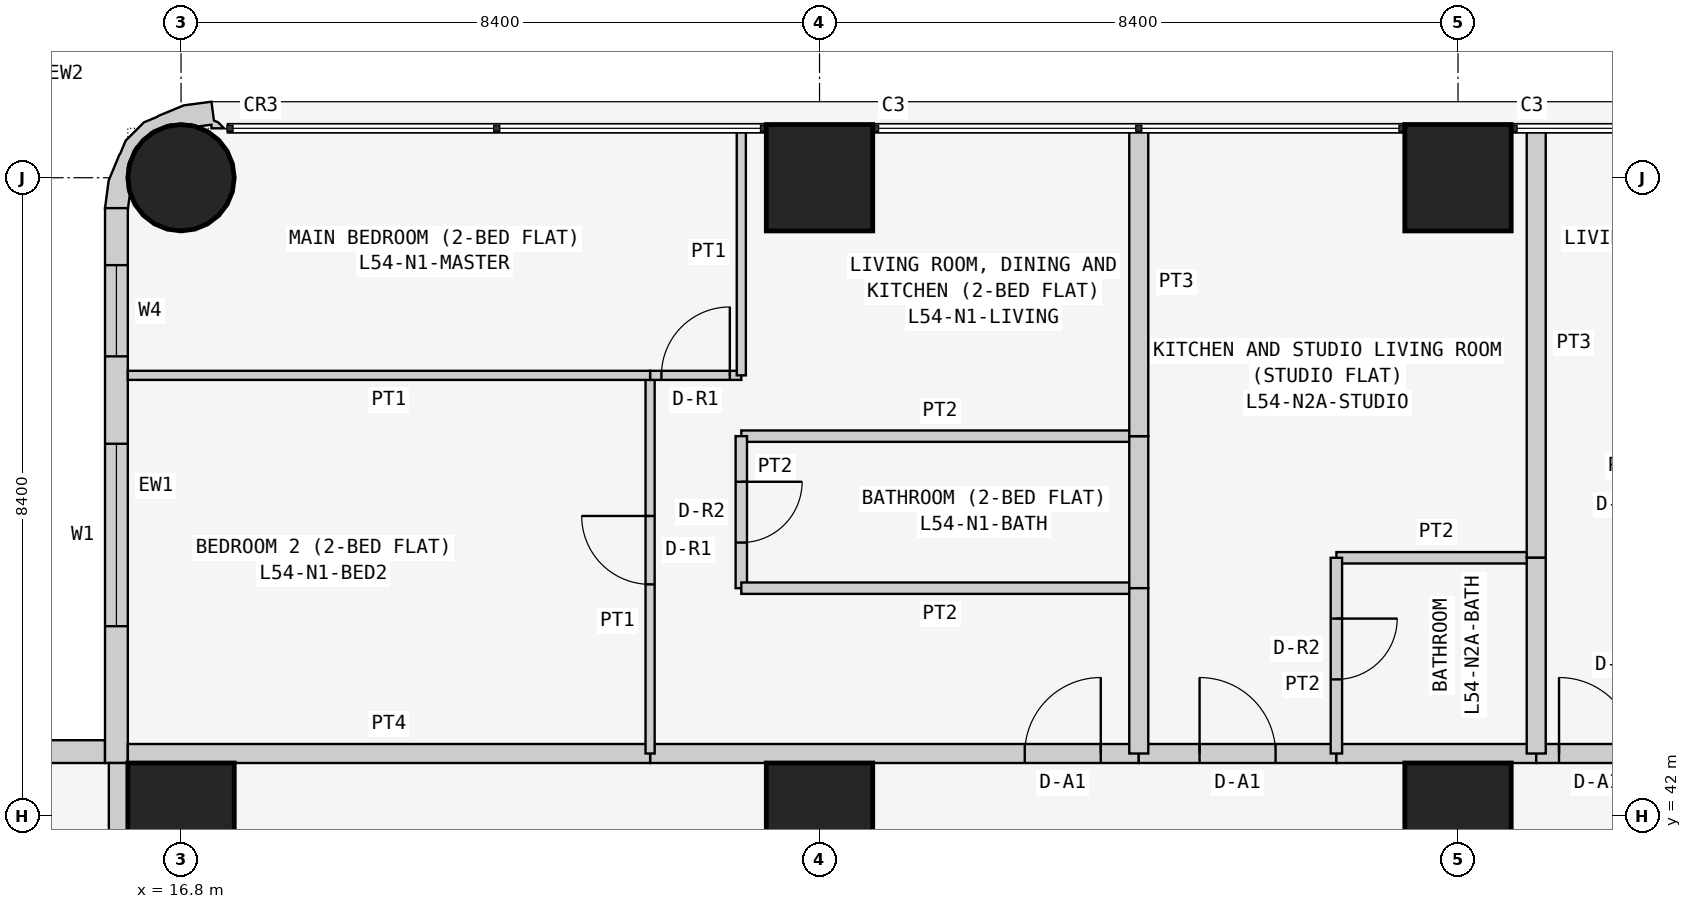
"""IFC4 building model, lengths in metres.
Left out: names, types, materials, properties, quantities, classifications, styles, units other than length and angle.
Written with IfcOpenShell. Run it as: python <this file> out.ifc"""

import sys

from ifc_helpers import new_model, si_unit, direction, frame, frame_2d, origin, origin_2d, place, context, subcontext, project, spatial, polyline, rectangle, circle, outline, extrude, element, fill, save


model = new_model("IFC4")
c1 = context("Model", 3, precision=1e-05, world=origin(), true_north=direction((0.0, 1.0)))
c2 = subcontext(c1, "Body", "Model", "MODEL_VIEW")
j1 = project(units=[si_unit("LENGTHUNIT", "METRE"), si_unit("PLANEANGLEUNIT", "RADIAN")], contexts=[c1])
p1 = place(None, origin())
s1 = spatial("IfcSite", under=j1, at=p1, CompositionType="ELEMENT")
p2 = place(p1, origin())
s2 = spatial("IfcBuilding", under=s1, at=p2, CompositionType="ELEMENT")
p3 = place(p2, frame((0.0, 0.0, 208.5)))
s3 = spatial("IfcBuildingStorey", under=s2, at=p3, CompositionType="ELEMENT", Elevation=208.5)
p4 = place(p3, frame((16.8, 42.0, 0.0), z_axis=(0.0, 0.0, 1.0), x_axis=(1.0, 0.0, 0.0)))
e1 = element("IfcColumn", 1, at=p4, inside=s3, PredefinedType="COLUMN", context=c2, shape_type="SweptSolid", body=[
    extrude(rectangle(XDim=1.4, YDim=1.4, at=origin_2d()), origin(), (0.0, 0.0, 1.0), 3.6),
])
p5 = place(p3, frame((16.8, 50.4, 0.0), z_axis=(0.0, 0.0, 1.0), x_axis=(1.0, 0.0, 0.0)))
e2 = element("IfcColumn", 2, at=p5, inside=s3, PredefinedType="COLUMN", context=c2, shape_type="SweptSolid", body=[
    extrude(circle(Radius=0.7, at=origin_2d()), origin(), (0.0, 0.0, 1.0), 3.6),
])
for number, where, z_axis, x_axis in (
    (3, (25.2, 42.0, 0.0), (0.0, 0.0, 1.0), (1.0, 0.0, 0.0)),
    (4, (25.2, 50.4, 0.0), (0.0, 0.0, 1.0), (1.0, 0.0, 0.0)),
    (5, (33.6, 42.0, 0.0), (0.0, 0.0, 1.0), (1.0, 0.0, 0.0)),
    (6, (33.6, 50.4, 0.0), (0.0, 0.0, 1.0), (1.0, 0.0, 0.0)),
):
    element("IfcColumn", number, at=place(p3, frame(where, z_axis=z_axis, x_axis=x_axis)), inside=s3, PredefinedType="COLUMN", context=c2, shape_type="SweptSolid", body=[
        extrude(rectangle(XDim=1.4, YDim=1.4, at=origin_2d()), origin(), (0.0, 0.0, 1.0), 3.6),
    ])
p6 = place(p3, frame((15.8, 42.85, 0.0), z_axis=(0.0, 0.0, 1.0), x_axis=(-1.0, 0.0, 0.0)))
e7 = element("IfcWall", 7, at=p6, inside=s3, PredefinedType="SOLIDWALL", context=c2, shape_type="SweptSolid", body=[
    extrude(rectangle(XDim=15.4, YDim=0.3, at=frame_2d((7.7, 0.0))), origin(), (0.0, 0.0, 1.0), 3.45),
])
p7 = place(p6, frame((1.2, 0.0, 0.9)))
e8 = element("IfcOpeningElement", 8, at=p7, cuts=e7, PredefinedType="OPENING", context=c2, shape_type="SweptSolid", body=[
    extrude(rectangle(XDim=1.8, YDim=1.5, at=frame_2d((0.9, 0.75))), frame((0.0, 0.16, 0.0), z_axis=(0.0, -1.0, 0.0), x_axis=(1.0, 0.0, 0.0)), (0.0, 0.0, 1.0), 0.32),
])
p8 = place(p6, frame((4.95, 0.0, 1.5)))
e9 = element("IfcOpeningElement", 9, at=p8, cuts=e7, PredefinedType="OPENING", context=c2, shape_type="SweptSolid", body=[
    extrude(rectangle(XDim=0.9, YDim=0.7, at=frame_2d((0.45, 0.35))), frame((0.0, 0.16, 0.0), z_axis=(0.0, -1.0, 0.0), x_axis=(1.0, 0.0, 0.0)), (0.0, 0.0, 1.0), 0.32),
])
p9 = place(p6, frame((8.5, 0.0, 0.9)))
e10 = element("IfcOpeningElement", 10, at=p9, cuts=e7, PredefinedType="OPENING", context=c2, shape_type="SweptSolid", body=[
    extrude(rectangle(XDim=1.8, YDim=1.5, at=frame_2d((0.9, 0.75))), frame((0.0, 0.16, 0.0), z_axis=(0.0, -1.0, 0.0), x_axis=(1.0, 0.0, 0.0)), (0.0, 0.0, 1.0), 0.32),
])
p10 = place(p6, frame((12.5, 0.0, 0.0)))
e11 = element("IfcOpeningElement", 11, at=p10, cuts=e7, PredefinedType="OPENING", context=c2, shape_type="SweptSolid", body=[
    extrude(rectangle(XDim=0.9, YDim=2.4, at=frame_2d((0.45, 1.2))), frame((0.0, 0.16, 0.0), z_axis=(0.0, -1.0, 0.0), x_axis=(1.0, 0.0, 0.0)), (0.0, 0.0, 1.0), 0.32),
])
p11 = place(p6, frame((13.5, 0.0, 0.9)))
e12 = element("IfcOpeningElement", 12, at=p11, cuts=e7, PredefinedType="OPENING", context=c2, shape_type="SweptSolid", body=[
    extrude(rectangle(XDim=1.2, YDim=1.5, at=frame_2d((0.6, 0.75))), frame((0.0, 0.16, 0.0), z_axis=(0.0, -1.0, 0.0), x_axis=(1.0, 0.0, 0.0)), (0.0, 0.0, 1.0), 0.32),
])
p12 = place(p3, frame((15.95, 50.0, 0.0), z_axis=(0.0, 0.0, 1.0), x_axis=(0.0, -1.0, 0.0)))
e13 = element("IfcWall", 13, at=p12, inside=s3, PredefinedType="SOLIDWALL", context=c2, shape_type="SweptSolid", body=[
    extrude(rectangle(XDim=7.3, YDim=0.3, at=frame_2d((3.65, 0.0))), origin(), (0.0, 0.0, 1.0), 3.45),
])
p13 = place(p12, frame((3.1, 0.0, 0.9)))
e14 = element("IfcOpeningElement", 14, at=p13, cuts=e13, PredefinedType="OPENING", context=c2, shape_type="SweptSolid", body=[
    extrude(rectangle(XDim=2.4, YDim=1.5, at=frame_2d((1.2, 0.75))), frame((0.0, 0.16, 0.0), z_axis=(0.0, -1.0, 0.0), x_axis=(1.0, 0.0, 0.0)), (0.0, 0.0, 1.0), 0.32),
])
p14 = place(p12, frame((0.75, 0.0, 0.9)))
e15 = element("IfcOpeningElement", 15, at=p14, cuts=e13, PredefinedType="OPENING", context=c2, shape_type="SweptSolid", body=[
    extrude(rectangle(XDim=1.2, YDim=1.5, at=frame_2d((0.6, 0.75))), frame((0.0, 0.16, 0.0), z_axis=(0.0, -1.0, 0.0), x_axis=(1.0, 0.0, 0.0)), (0.0, 0.0, 1.0), 0.32),
])
p15 = place(p3, frame((17.312, 50.988, 0.0), z_axis=(0.0, 0.0, 1.0), x_axis=(-0.439933741929, 0.898030234854, 0.0)))
e16 = element("IfcWall", 16, at=p15, inside=s3, PredefinedType="SOLIDWALL", context=c2, shape_type="SweptSolid", body=[
    extrude(outline(polyline([(0.138, -0.039), (0.182, -0.0), (0.419, -0.08), (0.536, 0.266), (0.559, 0.631), (0.555, 0.651), (0.566, 0.836), (0.456, 1.159), (0.333, 1.298), (0.324, 1.316), (0.082, 1.591), (-0.222, 1.793), (-0.39, 1.541), (-0.372, 1.532), (-0.195, 1.414), (-0.12, 1.41), (0.131, 1.287), (0.315, 1.078), (0.406, 0.814), (0.388, 0.536), (0.265, 0.285), (0.209, 0.236), (0.148, 0.053), (0.105, 0.074), (0.032, -0.076), (0.138, -0.039)])), origin(), (0.0, 0.0, 1.0), 3.45),
])
p16 = place(p3, frame((22.971, 42.825, 0.0), z_axis=(0.0, 0.0, 1.0), x_axis=(1.0, 0.0, 0.0)))
e17 = element("IfcWall", 17, at=p16, inside=s3, PredefinedType="PARTITIONING", context=c2, shape_type="SweptSolid", body=[
    extrude(rectangle(XDim=6.429, YDim=0.25, at=frame_2d((3.214, 0.0))), origin(), (0.0, 0.0, 1.0), 3.45),
])
p17 = place(p16, frame((4.929, 0.0, 0.0)))
e18 = element("IfcOpeningElement", 18, at=p17, cuts=e17, PredefinedType="OPENING", context=c2, shape_type="SweptSolid", body=[
    extrude(rectangle(XDim=1.0, YDim=2.1, at=frame_2d((0.5, 1.05))), frame((0.0, 0.135, 0.0), z_axis=(0.0, -1.0, 0.0), x_axis=(1.0, 0.0, 0.0)), (0.0, 0.0, 1.0), 0.27),
])
p18 = place(p3, frame((16.1, 42.825, 0.0), z_axis=(0.0, 0.0, 1.0), x_axis=(1.0, 0.0, 0.0)))
e19 = element("IfcWall", 19, at=p18, inside=s3, PredefinedType="PARTITIONING", context=c2, shape_type="SweptSolid", body=[
    extrude(rectangle(XDim=6.871, YDim=0.25, at=frame_2d((3.436, 0.0))), origin(), (0.0, 0.0, 1.0), 3.45),
])
p19 = place(p3, frame((29.4, 42.825, 0.0), z_axis=(0.0, 0.0, 1.0), x_axis=(1.0, 0.0, 0.0)))
e20 = element("IfcWall", 20, at=p19, inside=s3, PredefinedType="PARTITIONING", context=c2, shape_type="SweptSolid", body=[
    extrude(rectangle(XDim=2.6, YDim=0.25, at=frame_2d((1.3, 0.0))), origin(), (0.0, 0.0, 1.0), 3.45),
])
p20 = place(p19, frame((0.8, 0.0, 0.0)))
e21 = element("IfcOpeningElement", 21, at=p20, cuts=e20, PredefinedType="OPENING", context=c2, shape_type="SweptSolid", body=[
    extrude(rectangle(XDim=1.0, YDim=2.1, at=frame_2d((0.5, 1.05))), frame((0.0, 0.135, 0.0), z_axis=(0.0, -1.0, 0.0), x_axis=(1.0, 0.0, 0.0)), (0.0, 0.0, 1.0), 0.27),
])
p21 = place(p3, frame((32.0, 42.825, 0.0), z_axis=(0.0, 0.0, 1.0), x_axis=(1.0, 0.0, 0.0)))
e22 = element("IfcWall", 22, at=p21, inside=s3, PredefinedType="PARTITIONING", context=c2, shape_type="SweptSolid", body=[
    extrude(rectangle(XDim=2.629, YDim=0.25, at=frame_2d((1.314, 0.0))), origin(), (0.0, 0.0, 1.0), 3.45),
])
p22 = place(p3, frame((34.629, 42.825, 0.0), z_axis=(0.0, 0.0, 1.0), x_axis=(1.0, 0.0, 0.0)))
e23 = element("IfcWall", 23, at=p22, inside=s3, PredefinedType="PARTITIONING", context=c2, shape_type="SweptSolid", body=[
    extrude(rectangle(XDim=1.6, YDim=0.25, at=frame_2d((0.8, 0.0))), origin(), (0.0, 0.0, 1.0), 3.45),
])
p23 = place(p22, frame((0.3, 0.0, 0.0)))
e24 = element("IfcOpeningElement", 24, at=p23, cuts=e23, PredefinedType="OPENING", context=c2, shape_type="SweptSolid", body=[
    extrude(rectangle(XDim=1.0, YDim=2.1, at=frame_2d((0.5, 1.05))), frame((0.0, 0.135, 0.0), z_axis=(0.0, -1.0, 0.0), x_axis=(1.0, 0.0, 0.0)), (0.0, 0.0, 1.0), 0.27),
])
p24 = place(p3, frame((15.975, 35.829, 0.0), z_axis=(0.0, 0.0, 1.0), x_axis=(0.0, 1.0, 0.0)))
e25 = element("IfcWall", 25, at=p24, inside=s3, PredefinedType="PARTITIONING", context=c2, shape_type="SweptSolid", body=[
    extrude(rectangle(XDim=6.871, YDim=0.25, at=frame_2d((3.436, 0.0))), origin(), (0.0, 0.0, 1.0), 3.45),
])
p25 = place(p3, frame((29.4, 47.0, 0.0), z_axis=(0.0, 0.0, 1.0), x_axis=(-1.0, 0.0, 0.0)))
e26 = element("IfcWall", 26, at=p25, inside=s3, PredefinedType="PARTITIONING", context=c2, shape_type="SweptSolid", body=[
    extrude(rectangle(XDim=5.229, YDim=0.15, at=frame_2d((2.615, 0.0))), origin(), (0.0, 0.0, 1.0), 3.45),
])
p26 = place(p3, frame((24.171, 47.0, 0.0), z_axis=(0.0, 0.0, 1.0), x_axis=(0.0, -1.0, 0.0)))
e27 = element("IfcWall", 27, at=p26, inside=s3, PredefinedType="PARTITIONING", context=c2, shape_type="SweptSolid", body=[
    extrude(rectangle(XDim=2.0, YDim=0.15, at=frame_2d((1.0, 0.0))), origin(), (0.0, 0.0, 1.0), 3.45),
])
p27 = place(p26, frame((0.6, 0.0, 0.0)))
e28 = element("IfcOpeningElement", 28, at=p27, cuts=e27, PredefinedType="OPENING", context=c2, shape_type="SweptSolid", body=[
    extrude(rectangle(XDim=0.8, YDim=2.1, at=frame_2d((0.4, 1.05))), frame((0.0, 0.085, 0.0), z_axis=(0.0, -1.0, 0.0), x_axis=(1.0, 0.0, 0.0)), (0.0, 0.0, 1.0), 0.17),
])
p28 = place(p3, frame((24.171, 45.0, 0.0), z_axis=(0.0, 0.0, 1.0), x_axis=(1.0, 0.0, 0.0)))
e29 = element("IfcWall", 29, at=p28, inside=s3, PredefinedType="PARTITIONING", context=c2, shape_type="SweptSolid", body=[
    extrude(rectangle(XDim=5.229, YDim=0.15, at=frame_2d((2.615, 0.0))), origin(), (0.0, 0.0, 1.0), 3.45),
])
p29 = place(p3, frame((29.4, 45.0, 0.0), z_axis=(0.0, 0.0, 1.0), x_axis=(0.0, 1.0, 0.0)))
e30 = element("IfcWall", 30, at=p29, inside=s3, PredefinedType="PARTITIONING", context=c2, shape_type="SweptSolid", body=[
    extrude(rectangle(XDim=2.0, YDim=0.25, at=frame_2d((1.0, 0.0))), origin(), (0.0, 0.0, 1.0), 2.848),
])
p30 = place(p3, frame((22.971, 42.825, 0.0), z_axis=(0.0, 0.0, 1.0), x_axis=(0.0, 1.0, 0.0)))
e31 = element("IfcWall", 31, at=p30, inside=s3, PredefinedType="PARTITIONING", context=c2, shape_type="SweptSolid", body=[
    extrude(rectangle(XDim=4.975, YDim=0.12, at=frame_2d((2.488, 0.0))), origin(), (0.0, 0.0, 1.0), 3.45),
])
p31 = place(p30, frame((2.225, 0.0, 0.0)))
e32 = element("IfcOpeningElement", 32, at=p31, cuts=e31, PredefinedType="OPENING", context=c2, shape_type="SweptSolid", body=[
    extrude(rectangle(XDim=0.9, YDim=2.1, at=frame_2d((0.45, 1.05))), frame((0.0, 0.07, 0.0), z_axis=(0.0, -1.0, 0.0), x_axis=(1.0, 0.0, 0.0)), (0.0, 0.0, 1.0), 0.14),
])
p32 = place(p3, frame((22.971, 47.8, 0.0), z_axis=(0.0, 0.0, 1.0), x_axis=(1.0, 0.0, 0.0)))
e33 = element("IfcWall", 33, at=p32, inside=s3, PredefinedType="PARTITIONING", context=c2, shape_type="SweptSolid", body=[
    extrude(rectangle(XDim=1.2, YDim=0.12, at=frame_2d((0.6, 0.0))), origin(), (0.0, 0.0, 1.0), 3.45),
])
p33 = place(p32, frame((0.149, 0.0, 0.0)))
e34 = element("IfcOpeningElement", 34, at=p33, cuts=e33, PredefinedType="OPENING", context=c2, shape_type="SweptSolid", body=[
    extrude(rectangle(XDim=0.9, YDim=2.1, at=frame_2d((0.45, 1.05))), frame((0.0, 0.07, 0.0), z_axis=(0.0, -1.0, 0.0), x_axis=(1.0, 0.0, 0.0)), (0.0, 0.0, 1.0), 0.14),
])
p34 = place(p3, frame((24.171, 47.8, 0.0), z_axis=(0.0, 0.0, 1.0), x_axis=(0.0, 1.0, 0.0)))
e35 = element("IfcWall", 35, at=p34, inside=s3, PredefinedType="PARTITIONING", context=c2, shape_type="SweptSolid", body=[
    extrude(rectangle(XDim=3.25, YDim=0.12, at=frame_2d((1.625, 0.0))), origin(), (0.0, 0.0, 1.0), 3.45),
])
p35 = place(p3, frame((29.4, 45.0, 0.0), z_axis=(0.0, 0.0, 1.0), x_axis=(0.0, -1.0, 0.0)))
e36 = element("IfcWall", 36, at=p35, inside=s3, PredefinedType="PARTITIONING", context=c2, shape_type="SweptSolid", body=[
    extrude(rectangle(XDim=2.175, YDim=0.25, at=frame_2d((1.087, 0.0))), origin(), (0.0, 0.0, 1.0), 2.848),
])
p36 = place(p3, frame((29.4, 51.05, 0.0), z_axis=(0.0, 0.0, 1.0), x_axis=(0.0, -1.0, 0.0)))
e37 = element("IfcWall", 37, at=p36, inside=s3, PredefinedType="PARTITIONING", context=c2, shape_type="SweptSolid", body=[
    extrude(rectangle(XDim=4.05, YDim=0.25, at=frame_2d((2.025, 0.0))), origin(), (0.0, 0.0, 1.0), 2.848),
])
p37 = place(p3, frame((22.971, 47.8, 0.0), z_axis=(0.0, 0.0, 1.0), x_axis=(-1.0, 0.0, 0.0)))
e38 = element("IfcWall", 38, at=p37, inside=s3, PredefinedType="PARTITIONING", context=c2, shape_type="SweptSolid", body=[
    extrude(rectangle(XDim=6.871, YDim=0.12, at=frame_2d((3.436, 0.0))), origin(), (0.0, 0.0, 1.0), 3.45),
])
p38 = place(p3, frame((34.629, 45.4, 0.0), z_axis=(0.0, 0.0, 1.0), x_axis=(-1.0, 0.0, 0.0)))
e39 = element("IfcWall", 39, at=p38, inside=s3, PredefinedType="PARTITIONING", context=c2, shape_type="SweptSolid", body=[
    extrude(rectangle(XDim=2.629, YDim=0.15, at=frame_2d((1.314, 0.0))), origin(), (0.0, 0.0, 1.0), 3.45),
])
p39 = place(p3, frame((32.0, 45.4, 0.0), z_axis=(0.0, 0.0, 1.0), x_axis=(0.0, -1.0, 0.0)))
e40 = element("IfcWall", 40, at=p39, inside=s3, PredefinedType="PARTITIONING", context=c2, shape_type="SweptSolid", body=[
    extrude(rectangle(XDim=2.575, YDim=0.15, at=frame_2d((1.288, 0.0))), origin(), (0.0, 0.0, 1.0), 3.45),
])
p40 = place(p39, frame((0.8, 0.0, 0.0)))
e41 = element("IfcOpeningElement", 41, at=p40, cuts=e40, PredefinedType="OPENING", context=c2, shape_type="SweptSolid", body=[
    extrude(rectangle(XDim=0.8, YDim=2.1, at=frame_2d((0.4, 1.05))), frame((0.0, 0.085, 0.0), z_axis=(0.0, -1.0, 0.0), x_axis=(1.0, 0.0, 0.0)), (0.0, 0.0, 1.0), 0.17),
])
p41 = place(p3, frame((34.629, 51.05, 0.0), z_axis=(0.0, 0.0, 1.0), x_axis=(0.0, -1.0, 0.0)))
e42 = element("IfcWall", 42, at=p41, inside=s3, PredefinedType="PARTITIONING", context=c2, shape_type="SweptSolid", body=[
    extrude(rectangle(XDim=5.65, YDim=0.25, at=frame_2d((2.825, 0.0))), origin(), (0.0, 0.0, 1.0), 3.45),
])
p42 = place(p3, frame((34.629, 45.4, 0.0), z_axis=(0.0, 0.0, 1.0), x_axis=(0.0, -1.0, 0.0)))
e43 = element("IfcWall", 43, at=p42, inside=s3, PredefinedType="PARTITIONING", context=c2, shape_type="SweptSolid", body=[
    extrude(rectangle(XDim=2.575, YDim=0.25, at=frame_2d((1.288, 0.0))), origin(), (0.0, 0.0, 1.0), 3.45),
])
p43 = place(p13, origin())
e44 = element("IfcWindow", 44, at=p43, inside=s3, PartitioningType="SINGLE_PANEL", PredefinedType="WINDOW", context=c2, shape_type="SweptSolid", body=[
    extrude(rectangle(XDim=2.4, YDim=1.5, at=frame_2d((1.2, 0.75))), frame((0.0, 0.03, 0.0), z_axis=(0.0, -1.0, 0.0), x_axis=(1.0, 0.0, 0.0)), (0.0, 0.0, 1.0), 0.06),
])
fill(e14, e44)
p44 = place(p14, origin())
e45 = element("IfcWindow", 45, at=p44, inside=s3, PartitioningType="SINGLE_PANEL", PredefinedType="WINDOW", context=c2, shape_type="SweptSolid", body=[
    extrude(rectangle(XDim=1.2, YDim=1.5, at=frame_2d((0.6, 0.75))), frame((0.0, 0.03, 0.0), z_axis=(0.0, -1.0, 0.0), x_axis=(1.0, 0.0, 0.0)), (0.0, 0.0, 1.0), 0.06),
])
fill(e15, e45)
p45 = place(p17, origin())
e46 = element("IfcDoor", 46, at=p45, inside=s3, OperationType="SINGLE_SWING_RIGHT", PredefinedType="DOOR", context=c2, shape_type="SweptSolid", body=[
    extrude(rectangle(XDim=1.0, YDim=2.1, at=frame_2d((0.5, 1.05))), frame((0.0, 0.025, 0.0), z_axis=(0.0, -1.0, 0.0), x_axis=(1.0, 0.0, 0.0)), (0.0, 0.0, 1.0), 0.05),
])
fill(e18, e46)
p46 = place(p27, origin())
e47 = element("IfcDoor", 47, at=p46, inside=s3, OperationType="SINGLE_SWING_LEFT", PredefinedType="DOOR", context=c2, shape_type="SweptSolid", body=[
    extrude(rectangle(XDim=0.8, YDim=2.1, at=frame_2d((0.4, 1.05))), frame((0.0, 0.025, 0.0), z_axis=(0.0, -1.0, 0.0), x_axis=(1.0, 0.0, 0.0)), (0.0, 0.0, 1.0), 0.05),
])
fill(e28, e47)
p47 = place(p31, origin())
e48 = element("IfcDoor", 48, at=p47, inside=s3, OperationType="SINGLE_SWING_RIGHT", PredefinedType="DOOR", context=c2, shape_type="SweptSolid", body=[
    extrude(rectangle(XDim=0.9, YDim=2.1, at=frame_2d((0.45, 1.05))), frame((0.0, 0.025, 0.0), z_axis=(0.0, -1.0, 0.0), x_axis=(1.0, 0.0, 0.0)), (0.0, 0.0, 1.0), 0.05),
])
fill(e32, e48)
p48 = place(p33, origin())
e49 = element("IfcDoor", 49, at=p48, inside=s3, OperationType="SINGLE_SWING_RIGHT", PredefinedType="DOOR", context=c2, shape_type="SweptSolid", body=[
    extrude(rectangle(XDim=0.9, YDim=2.1, at=frame_2d((0.45, 1.05))), frame((0.0, 0.025, 0.0), z_axis=(0.0, -1.0, 0.0), x_axis=(1.0, 0.0, 0.0)), (0.0, 0.0, 1.0), 0.05),
])
fill(e34, e49)
p49 = place(p20, origin())
e50 = element("IfcDoor", 50, at=p49, inside=s3, OperationType="SINGLE_SWING_LEFT", PredefinedType="DOOR", context=c2, shape_type="SweptSolid", body=[
    extrude(rectangle(XDim=1.0, YDim=2.1, at=frame_2d((0.5, 1.05))), frame((0.0, 0.025, 0.0), z_axis=(0.0, -1.0, 0.0), x_axis=(1.0, 0.0, 0.0)), (0.0, 0.0, 1.0), 0.05),
])
fill(e21, e50)
p50 = place(p40, origin())
e51 = element("IfcDoor", 51, at=p50, inside=s3, OperationType="SINGLE_SWING_LEFT", PredefinedType="DOOR", context=c2, shape_type="SweptSolid", body=[
    extrude(rectangle(XDim=0.8, YDim=2.1, at=frame_2d((0.4, 1.05))), frame((0.0, 0.025, 0.0), z_axis=(0.0, -1.0, 0.0), x_axis=(1.0, 0.0, 0.0)), (0.0, 0.0, 1.0), 0.05),
])
fill(e41, e51)
p51 = place(p23, origin())
e52 = element("IfcDoor", 52, at=p51, inside=s3, OperationType="SINGLE_SWING_LEFT", PredefinedType="DOOR", context=c2, shape_type="SweptSolid", body=[
    extrude(rectangle(XDim=1.0, YDim=2.1, at=frame_2d((0.5, 1.05))), frame((0.0, 0.025, 0.0), z_axis=(0.0, -1.0, 0.0), x_axis=(1.0, 0.0, 0.0)), (0.0, 0.0, 1.0), 0.05),
])
fill(e24, e52)
save(model, sys.argv[1])
